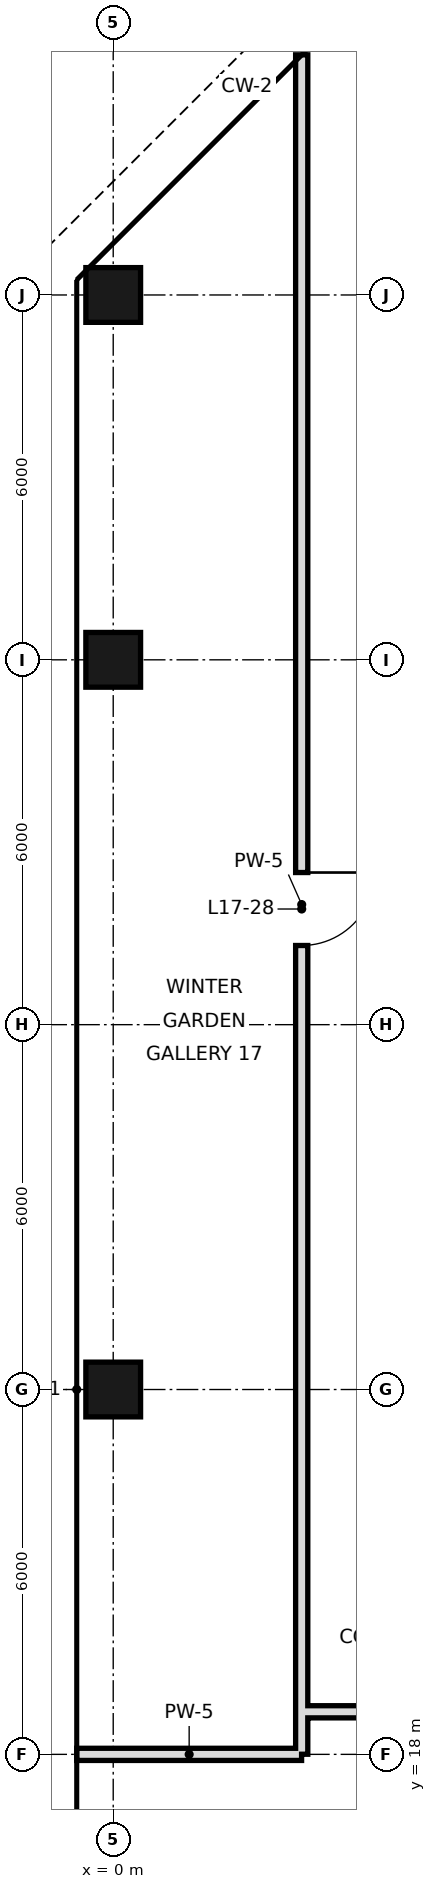
"""IFC4 building model, lengths in metres.
Left out: names, types, materials, properties, quantities, classifications, styles, units other than length and angle.
Written with IfcOpenShell. Run it as: python <this file> out.ifc"""

import sys

from ifc_helpers import new_model, si_unit, direction, frame, frame_2d, origin, origin_2d, place, context, subcontext, project, spatial, rectangle, hollow_rectangle, extrude, element, fill, save


model = new_model("IFC4")
c1 = context("Model", 3, precision=1e-05, world=origin(), true_north=direction((0.0, 1.0)))
c2 = subcontext(c1, "Body", "Model", "MODEL_VIEW")
j1 = project(units=[si_unit("LENGTHUNIT", "METRE"), si_unit("PLANEANGLEUNIT", "RADIAN")], contexts=[c1])
p1 = place(None, origin())
s1 = spatial("IfcSite", under=j1, at=p1, CompositionType="ELEMENT")
p2 = place(p1, origin())
s2 = spatial("IfcBuilding", under=s1, at=p2, CompositionType="ELEMENT")
p3 = place(p2, frame((0.0, 0.0, 82.2)))
s3 = spatial("IfcBuildingStorey", under=s2, at=p3, CompositionType="ELEMENT", Elevation=82.2)
for number, where, z_axis, x_axis in (
    (1, (0.0, 24.0, 0.0), (0.0, 0.0, 1.0), (1.0, 0.0, 0.0)),
    (2, (0.0, 36.0, 0.0), (0.0, 0.0, 1.0), (1.0, 0.0, 0.0)),
    (3, (0.0, 42.0, 0.0), (0.0, 0.0, 1.0), (1.0, 0.0, 0.0)),
):
    element("IfcColumn", number, at=place(p3, frame(where, z_axis=z_axis, x_axis=x_axis)), inside=s3, PredefinedType="COLUMN", context=c2, shape_type="SweptSolid", body=[
        extrude(hollow_rectangle(XDim=0.9, YDim=0.9, WallThickness=0.045, at=origin_2d()), origin(), (0.0, 0.0, 1.0), 3.6),
    ])
p4 = place(p3, frame((3.1, 18.002, 0.0), z_axis=(0.0, 0.0, 1.0), x_axis=(0.0, 1.0, 0.0)))
e4 = element("IfcWall", 4, at=p4, inside=s3, PredefinedType="SOLIDWALL", context=c2, shape_type="SweptSolid", body=[
    extrude(rectangle(XDim=27.947, YDim=0.2, at=frame_2d((13.974, 0.0))), origin(), (0.0, 0.0, 1.0), 2.97),
])
p5 = place(p4, frame((13.3, 0.0, 0.0)))
e5 = element("IfcOpeningElement", 5, at=p5, cuts=e4, PredefinedType="OPENING", context=c2, shape_type="SweptSolid", body=[
    extrude(rectangle(XDim=1.2, YDim=2.4, at=frame_2d((0.6, 1.2))), frame((0.0, 0.11, 0.0), z_axis=(0.0, -1.0, 0.0), x_axis=(1.0, 0.0, 0.0)), (0.0, 0.0, 1.0), 0.22),
])
p6 = place(p3, frame((-0.6, 18.0, 0.0), z_axis=(0.0, 0.0, 1.0), x_axis=(1.0, 0.0, 0.0)))
e6 = element("IfcWall", 6, at=p6, inside=s3, PredefinedType="SOLIDWALL", context=c2, shape_type="SweptSolid", body=[
    extrude(rectangle(XDim=3.698, YDim=0.2, at=frame_2d((1.849, 0.0))), origin(), (0.0, 0.0, 1.0), 2.72),
])
p7 = place(p3, frame((3.1, 18.7, 0.0), z_axis=(0.0, 0.0, 1.0), x_axis=(1.0, 0.0, 0.0)))
e7 = element("IfcWall", 7, at=p7, inside=s3, PredefinedType="SOLIDWALL", context=c2, shape_type="SweptSolid", body=[
    extrude(rectangle(XDim=41.8, YDim=0.2, at=frame_2d((20.9, 0.0))), origin(), (0.0, 0.0, 1.0), 2.72),
])
p8 = place(p7, frame((36.16, 0.0, 0.0)))
e8 = element("IfcOpeningElement", 8, at=p8, cuts=e7, PredefinedType="OPENING", context=c2, shape_type="SweptSolid", body=[
    extrude(rectangle(XDim=1.2, YDim=2.4, at=frame_2d((0.6, 1.2))), frame((0.0, 0.11, 0.0), z_axis=(0.0, -1.0, 0.0), x_axis=(1.0, 0.0, 0.0)), (0.0, 0.0, 1.0), 0.22),
])
p9 = place(p7, frame((15.55, 0.0, 0.0)))
e9 = element("IfcOpeningElement", 9, at=p9, cuts=e7, PredefinedType="OPENING", context=c2, shape_type="SweptSolid", body=[
    extrude(rectangle(XDim=1.8, YDim=2.4, at=frame_2d((0.9, 1.2))), frame((0.0, 0.11, 0.0), z_axis=(0.0, -1.0, 0.0), x_axis=(1.0, 0.0, 0.0)), (0.0, 0.0, 1.0), 0.22),
])
p10 = place(p5, origin())
e10 = element("IfcDoor", 10, at=p10, inside=s3, OperationType="SINGLE_SWING_RIGHT", PredefinedType="DOOR", context=c2, shape_type="SweptSolid", body=[
    extrude(rectangle(XDim=1.2, YDim=2.4, at=frame_2d((0.6, 1.2))), frame((0.0, 0.025, 0.0), z_axis=(0.0, -1.0, 0.0), x_axis=(1.0, 0.0, 0.0)), (0.0, 0.0, 1.0), 0.05),
])
fill(e5, e10)
save(model, sys.argv[1])
